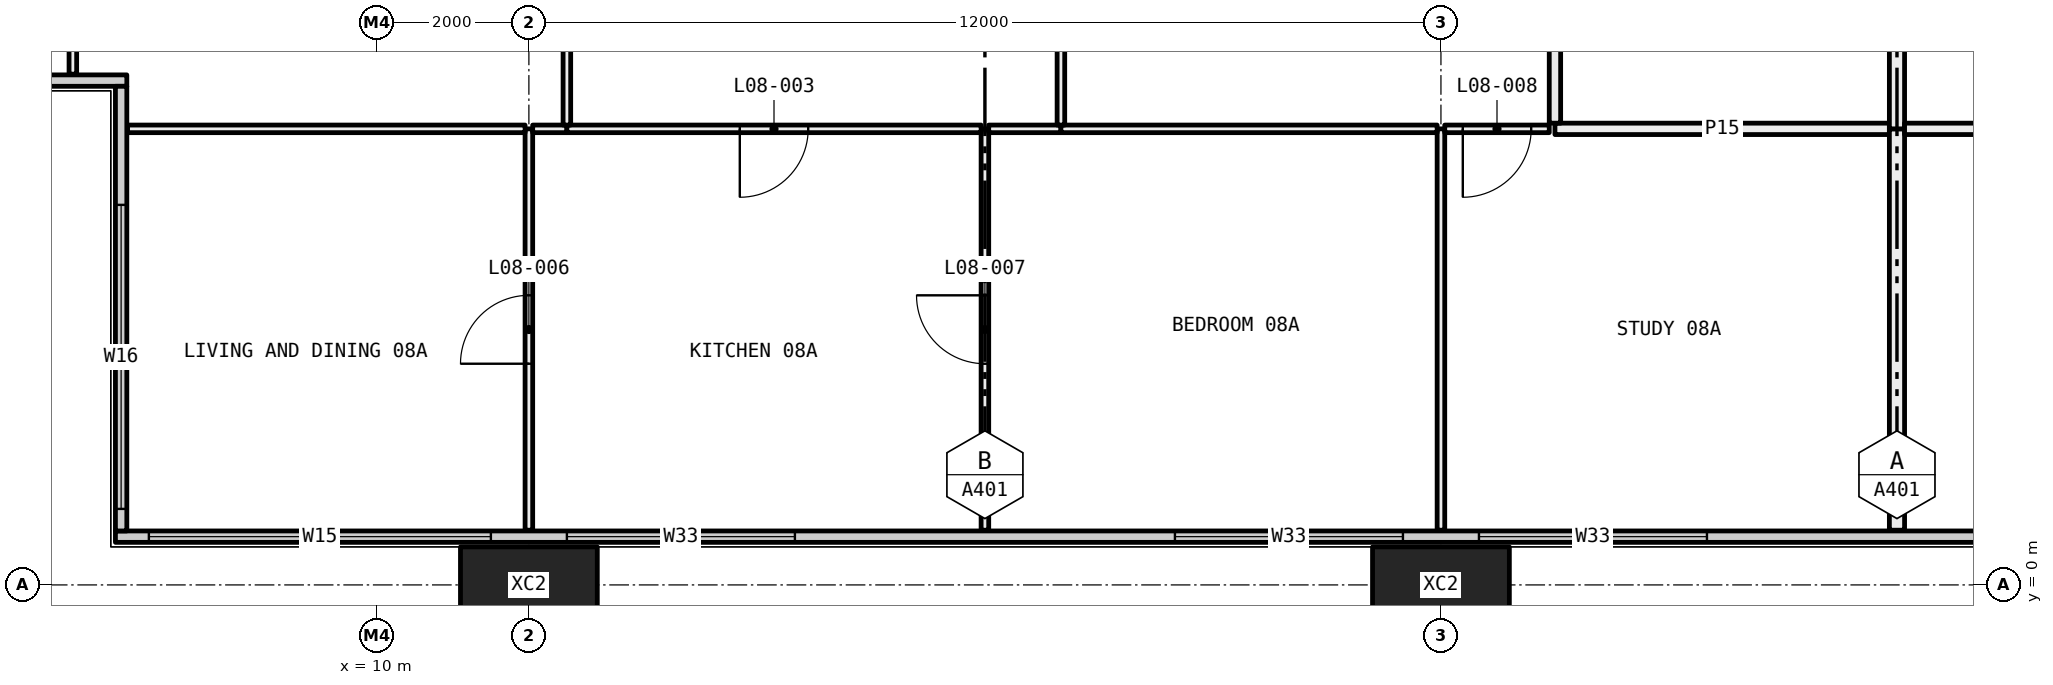
"""IFC4 building model, lengths in metres.
Left out: names, types, materials, properties, quantities, classifications, styles, units other than length and angle.
Written with IfcOpenShell. Run it as: python <this file> out.ifc"""

import sys

from ifc_helpers import new_model, si_unit, direction, frame, frame_2d, origin, origin_2d, place, context, subcontext, project, spatial, rectangle, hollow_rectangle, extrude, element, fill, save


model = new_model("IFC4")
c1 = context("Model", 3, precision=1e-05, world=origin(), true_north=direction((0.0, 1.0)))
c2 = subcontext(c1, "Body", "Model", "MODEL_VIEW")
j1 = project(units=[si_unit("LENGTHUNIT", "METRE"), si_unit("PLANEANGLEUNIT", "RADIAN")], contexts=[c1])
p1 = place(None, origin())
s1 = spatial("IfcSite", under=j1, at=p1, CompositionType="ELEMENT")
p2 = place(p1, origin())
s2 = spatial("IfcBuilding", under=s1, at=p2, CompositionType="ELEMENT")
p3 = place(p2, frame((0.0, 0.0, 40.35)))
s3 = spatial("IfcBuildingStorey", under=s2, at=p3, CompositionType="ELEMENT", Elevation=40.35)
for number, where, z_axis, x_axis in (
    (1, (12.0, 0.0, -0.4), (0.0, 0.0, 1.0), (1.0, 0.0, 0.0)),
    (2, (24.0, 0.0, -0.4), (0.0, 0.0, 1.0), (1.0, 0.0, 0.0)),
):
    element("IfcColumn", number, at=place(p3, frame(where, z_axis=z_axis, x_axis=x_axis)), inside=s3, PredefinedType="COLUMN", context=c2, shape_type="SweptSolid", body=[
        extrude(hollow_rectangle(XDim=1.8, YDim=1.0, WallThickness=0.07, at=origin_2d()), origin(), (0.0, 0.0, 1.0), 3.45),
    ])
p4 = place(p3, frame((6.56, 0.635, 0.0), z_axis=(0.0, 0.0, 1.0), x_axis=(1.0, 0.0, 0.0)))
e3 = element("IfcWall", 3, at=p4, inside=s3, PredefinedType="ELEMENTEDWALL", context=c2, shape_type="SweptSolid", body=[
    extrude(rectangle(XDim=58.88, YDim=0.15, at=frame_2d((29.44, 0.0))), origin(), (0.0, 0.0, 1.0), 3.05),
])
p5 = place(p4, frame((0.44, 0.0, 0.45)))
e4 = element("IfcOpeningElement", 4, at=p5, cuts=e3, PredefinedType="OPENING", context=c2, shape_type="SweptSolid", body=[
    extrude(rectangle(XDim=4.5, YDim=2.55, at=frame_2d((2.25, 1.275))), frame((0.0, 0.085, 0.0), z_axis=(0.0, -1.0, 0.0), x_axis=(1.0, 0.0, 0.0)), (0.0, 0.0, 1.0), 0.17),
])
p6 = place(p4, frame((5.94, 0.0, 0.45)))
e5 = element("IfcOpeningElement", 5, at=p6, cuts=e3, PredefinedType="OPENING", context=c2, shape_type="SweptSolid", body=[
    extrude(rectangle(XDim=3.0, YDim=2.55, at=frame_2d((1.5, 1.275))), frame((0.0, 0.085, 0.0), z_axis=(0.0, -1.0, 0.0), x_axis=(1.0, 0.0, 0.0)), (0.0, 0.0, 1.0), 0.17),
])
p7 = place(p4, frame((13.94, 0.0, 0.45)))
e6 = element("IfcOpeningElement", 6, at=p7, cuts=e3, PredefinedType="OPENING", context=c2, shape_type="SweptSolid", body=[
    extrude(rectangle(XDim=3.0, YDim=2.55, at=frame_2d((1.5, 1.275))), frame((0.0, 0.085, 0.0), z_axis=(0.0, -1.0, 0.0), x_axis=(1.0, 0.0, 0.0)), (0.0, 0.0, 1.0), 0.17),
])
p8 = place(p4, frame((17.94, 0.0, 0.45)))
e7 = element("IfcOpeningElement", 7, at=p8, cuts=e3, PredefinedType="OPENING", context=c2, shape_type="SweptSolid", body=[
    extrude(rectangle(XDim=3.0, YDim=2.55, at=frame_2d((1.5, 1.275))), frame((0.0, 0.085, 0.0), z_axis=(0.0, -1.0, 0.0), x_axis=(1.0, 0.0, 0.0)), (0.0, 0.0, 1.0), 0.17),
])
p9 = place(p4, frame((26.94, 0.0, 0.45)))
e8 = element("IfcOpeningElement", 8, at=p9, cuts=e3, PredefinedType="OPENING", context=c2, shape_type="SweptSolid", body=[
    extrude(rectangle(XDim=2.0, YDim=2.55, at=frame_2d((1.0, 1.275))), frame((0.0, 0.085, 0.0), z_axis=(0.0, -1.0, 0.0), x_axis=(1.0, 0.0, 0.0)), (0.0, 0.0, 1.0), 0.17),
])
p10 = place(p4, frame((29.94, 0.0, 0.45)))
e9 = element("IfcOpeningElement", 9, at=p10, cuts=e3, PredefinedType="OPENING", context=c2, shape_type="SweptSolid", body=[
    extrude(rectangle(XDim=3.0, YDim=2.55, at=frame_2d((1.5, 1.275))), frame((0.0, 0.085, 0.0), z_axis=(0.0, -1.0, 0.0), x_axis=(1.0, 0.0, 0.0)), (0.0, 0.0, 1.0), 0.17),
])
p11 = place(p4, frame((37.94, 0.0, 0.45)))
e10 = element("IfcOpeningElement", 10, at=p11, cuts=e3, PredefinedType="OPENING", context=c2, shape_type="SweptSolid", body=[
    extrude(rectangle(XDim=3.0, YDim=2.55, at=frame_2d((1.5, 1.275))), frame((0.0, 0.085, 0.0), z_axis=(0.0, -1.0, 0.0), x_axis=(1.0, 0.0, 0.0)), (0.0, 0.0, 1.0), 0.17),
])
p12 = place(p4, frame((41.94, 0.0, 0.45)))
e11 = element("IfcOpeningElement", 11, at=p12, cuts=e3, PredefinedType="OPENING", context=c2, shape_type="SweptSolid", body=[
    extrude(rectangle(XDim=3.0, YDim=2.55, at=frame_2d((1.5, 1.275))), frame((0.0, 0.085, 0.0), z_axis=(0.0, -1.0, 0.0), x_axis=(1.0, 0.0, 0.0)), (0.0, 0.0, 1.0), 0.17),
])
p13 = place(p4, frame((50.94, 0.0, 0.45)))
e12 = element("IfcOpeningElement", 12, at=p13, cuts=e3, PredefinedType="OPENING", context=c2, shape_type="SweptSolid", body=[
    extrude(rectangle(XDim=2.0, YDim=2.55, at=frame_2d((1.0, 1.275))), frame((0.0, 0.085, 0.0), z_axis=(0.0, -1.0, 0.0), x_axis=(1.0, 0.0, 0.0)), (0.0, 0.0, 1.0), 0.17),
])
p14 = place(p4, frame((53.94, 0.0, 0.45)))
e13 = element("IfcOpeningElement", 13, at=p14, cuts=e3, PredefinedType="OPENING", context=c2, shape_type="SweptSolid", body=[
    extrude(rectangle(XDim=4.5, YDim=2.55, at=frame_2d((2.25, 1.275))), frame((0.0, 0.085, 0.0), z_axis=(0.0, -1.0, 0.0), x_axis=(1.0, 0.0, 0.0)), (0.0, 0.0, 1.0), 0.17),
])
p15 = place(p3, frame((0.56, 6.635, 0.0), z_axis=(0.0, 0.0, 1.0), x_axis=(1.0, 0.0, 0.0)))
e14 = element("IfcWall", 14, at=p15, inside=s3, PredefinedType="ELEMENTEDWALL", context=c2, shape_type="SweptSolid", body=[
    extrude(rectangle(XDim=6.15, YDim=0.15, at=frame_2d((3.075, 0.0))), origin(), (0.0, 0.0, 1.0), 3.05),
])
p16 = place(p15, frame((0.44, 0.0, 0.45)))
e15 = element("IfcOpeningElement", 15, at=p16, cuts=e14, PredefinedType="OPENING", context=c2, shape_type="SweptSolid", body=[
    extrude(rectangle(XDim=4.0, YDim=2.55, at=frame_2d((2.0, 1.275))), frame((0.0, 0.085, 0.0), z_axis=(0.0, -1.0, 0.0), x_axis=(1.0, 0.0, 0.0)), (0.0, 0.0, 1.0), 0.17),
])
p17 = place(p3, frame((6.635, 0.71, 0.0), z_axis=(0.0, 0.0, 1.0), x_axis=(0.0, 1.0, 0.0)))
e16 = element("IfcWall", 16, at=p17, inside=s3, PredefinedType="ELEMENTEDWALL", context=c2, shape_type="SweptSolid", body=[
    extrude(rectangle(XDim=5.85, YDim=0.15, at=frame_2d((2.925, 0.0))), origin(), (0.0, 0.0, 1.0), 3.05),
])
p18 = place(p17, frame((0.29, 0.0, 0.45)))
e17 = element("IfcOpeningElement", 17, at=p18, cuts=e16, PredefinedType="OPENING", context=c2, shape_type="SweptSolid", body=[
    extrude(rectangle(XDim=4.0, YDim=2.55, at=frame_2d((2.0, 1.275))), frame((0.0, 0.085, 0.0), z_axis=(0.0, -1.0, 0.0), x_axis=(1.0, 0.0, 0.0)), (0.0, 0.0, 1.0), 0.17),
])
p19 = place(p3, frame((12.0, 0.72, 0.0), z_axis=(0.0, 0.0, 1.0), x_axis=(0.0, 1.0, 0.0)))
e18 = element("IfcWall", 18, at=p19, inside=s3, PredefinedType="PARTITIONING", context=c2, shape_type="SweptSolid", body=[
    extrude(rectangle(XDim=5.28, YDim=0.1, at=frame_2d((2.64, 0.0))), origin(), (0.0, 0.0, 1.0), 2.45),
])
p20 = place(p19, frame((2.19, 0.0, 0.0)))
e19 = element("IfcOpeningElement", 19, at=p20, cuts=e18, PredefinedType="OPENING", context=c2, shape_type="SweptSolid", body=[
    extrude(rectangle(XDim=0.9, YDim=2.1, at=frame_2d((0.45, 1.05))), frame((0.0, 0.06, 0.0), z_axis=(0.0, -1.0, 0.0), x_axis=(1.0, 0.0, 0.0)), (0.0, 0.0, 1.0), 0.12),
])
p21 = place(p3, frame((11.95, 6.0, 0.0), z_axis=(0.0, 0.0, 1.0), x_axis=(-1.0, 0.0, 0.0)))
e20 = element("IfcWall", 20, at=p21, inside=s3, PredefinedType="PARTITIONING", context=c2, shape_type="SweptSolid", body=[
    extrude(rectangle(XDim=5.23, YDim=0.1, at=frame_2d((2.615, 0.0))), origin(), (0.0, 0.0, 1.0), 2.45),
])
p22 = place(p3, frame((18.0, 0.72, 0.0), z_axis=(0.0, 0.0, 1.0), x_axis=(0.0, 1.0, 0.0)))
e21 = element("IfcWall", 21, at=p22, inside=s3, PredefinedType="PARTITIONING", context=c2, shape_type="SweptSolid", body=[
    extrude(rectangle(XDim=5.28, YDim=0.1, at=frame_2d((2.64, 0.0))), origin(), (0.0, 0.0, 1.0), 3.05),
])
p23 = place(p22, frame((2.19, 0.0, 0.0)))
e22 = element("IfcOpeningElement", 22, at=p23, cuts=e21, PredefinedType="OPENING", context=c2, shape_type="SweptSolid", body=[
    extrude(rectangle(XDim=0.9, YDim=2.1, at=frame_2d((0.45, 1.05))), frame((0.0, 0.06, 0.0), z_axis=(0.0, -1.0, 0.0), x_axis=(1.0, 0.0, 0.0)), (0.0, 0.0, 1.0), 0.12),
])
p24 = place(p3, frame((12.5, 6.0, 0.0), z_axis=(0.0, 0.0, 1.0), x_axis=(-1.0, 0.0, 0.0)))
e23 = element("IfcWall", 23, at=p24, inside=s3, PredefinedType="PARTITIONING", context=c2, shape_type="SweptSolid", body=[
    extrude(rectangle(XDim=0.45, YDim=0.1, at=frame_2d((0.225, 0.0))), origin(), (0.0, 0.0, 1.0), 2.45),
])
p25 = place(p3, frame((17.95, 6.0, 0.0), z_axis=(0.0, 0.0, 1.0), x_axis=(-1.0, 0.0, 0.0)))
e24 = element("IfcWall", 24, at=p25, inside=s3, PredefinedType="PARTITIONING", context=c2, shape_type="SweptSolid", body=[
    extrude(rectangle(XDim=5.45, YDim=0.1, at=frame_2d((2.725, 0.0))), origin(), (0.0, 0.0, 1.0), 3.05),
])
p26 = place(p25, frame((2.275, 0.0, 0.0)))
e25 = element("IfcOpeningElement", 25, at=p26, cuts=e24, PredefinedType="OPENING", context=c2, shape_type="SweptSolid", body=[
    extrude(rectangle(XDim=0.9, YDim=2.1, at=frame_2d((0.45, 1.05))), frame((0.0, 0.06, 0.0), z_axis=(0.0, -1.0, 0.0), x_axis=(1.0, 0.0, 0.0)), (0.0, 0.0, 1.0), 0.12),
])
p27 = place(p3, frame((24.0, 0.72, 0.0), z_axis=(0.0, 0.0, 1.0), x_axis=(0.0, 1.0, 0.0)))
e26 = element("IfcWall", 26, at=p27, inside=s3, PredefinedType="PARTITIONING", context=c2, shape_type="SweptSolid", body=[
    extrude(rectangle(XDim=5.28, YDim=0.1, at=frame_2d((2.64, 0.0))), origin(), (0.0, 0.0, 1.0), 2.45),
])
p28 = place(p3, frame((19.0, 6.0, 0.0), z_axis=(0.0, 0.0, 1.0), x_axis=(-1.0, 0.0, 0.0)))
e27 = element("IfcWall", 27, at=p28, inside=s3, PredefinedType="PARTITIONING", context=c2, shape_type="SweptSolid", body=[
    extrude(rectangle(XDim=0.95, YDim=0.1, at=frame_2d((0.475, 0.0))), origin(), (0.0, 0.0, 1.0), 3.05),
])
p29 = place(p3, frame((23.95, 6.0, 0.0), z_axis=(0.0, 0.0, 1.0), x_axis=(-1.0, 0.0, 0.0)))
e28 = element("IfcWall", 28, at=p29, inside=s3, PredefinedType="PARTITIONING", context=c2, shape_type="SweptSolid", body=[
    extrude(rectangle(XDim=4.95, YDim=0.1, at=frame_2d((2.475, 0.0))), origin(), (0.0, 0.0, 1.0), 2.45),
])
p30 = place(p3, frame((25.425, 6.0, 0.0), z_axis=(0.0, 0.0, 1.0), x_axis=(-1.0, 0.0, 0.0)))
e29 = element("IfcWall", 29, at=p30, inside=s3, PredefinedType="PARTITIONING", context=c2, shape_type="SweptSolid", body=[
    extrude(rectangle(XDim=1.375, YDim=0.1, at=frame_2d((0.688, 0.0))), origin(), (0.0, 0.0, 1.0), 2.45),
])
p31 = place(p30, frame((0.238, 0.0, 0.0)))
e30 = element("IfcOpeningElement", 30, at=p31, cuts=e29, PredefinedType="OPENING", context=c2, shape_type="SweptSolid", body=[
    extrude(rectangle(XDim=0.9, YDim=2.1, at=frame_2d((0.45, 1.05))), frame((0.0, 0.06, 0.0), z_axis=(0.0, -1.0, 0.0), x_axis=(1.0, 0.0, 0.0)), (0.0, 0.0, 1.0), 0.12),
])
p32 = place(p3, frame((29.9, 6.0, 0.0), z_axis=(0.0, 0.0, 1.0), x_axis=(-1.0, 0.0, 0.0)))
e31 = element("IfcWall", 31, at=p32, inside=s3, PredefinedType="PARTITIONING", context=c2, shape_type="SweptSolid", body=[
    extrude(rectangle(XDim=4.4, YDim=0.15, at=frame_2d((2.2, 0.0))), origin(), (0.0, 0.0, 1.0), 3.05),
])
p33 = place(p3, frame((30.0, 0.72, 0.0), z_axis=(0.0, 0.0, 1.0), x_axis=(0.0, 1.0, 0.0)))
e32 = element("IfcWall", 32, at=p33, inside=s3, PredefinedType="PARTITIONING", context=c2, shape_type="SweptSolid", body=[
    extrude(rectangle(XDim=5.28, YDim=0.2, at=frame_2d((2.64, 0.0))), origin(), (0.0, 0.0, 1.0), 3.05),
])
p34 = place(p3, frame((6.0, 6.72, 0.0), z_axis=(0.0, 0.0, 1.0), x_axis=(0.0, 1.0, 0.0)))
e33 = element("IfcWall", 33, at=p34, inside=s3, PredefinedType="PARTITIONING", context=c2, shape_type="SweptSolid", body=[
    extrude(rectangle(XDim=5.28, YDim=0.1, at=frame_2d((2.64, 0.0))), origin(), (0.0, 0.0, 1.0), 2.45),
])
p35 = place(p34, frame((2.19, 0.0, 0.0)))
e34 = element("IfcOpeningElement", 34, at=p35, cuts=e33, PredefinedType="OPENING", context=c2, shape_type="SweptSolid", body=[
    extrude(rectangle(XDim=0.9, YDim=2.1, at=frame_2d((0.45, 1.05))), frame((0.0, 0.06, 0.0), z_axis=(0.0, -1.0, 0.0), x_axis=(1.0, 0.0, 0.0)), (0.0, 0.0, 1.0), 0.12),
])
p36 = place(p3, frame((12.5, 6.05, 0.0), z_axis=(0.0, 0.0, 1.0), x_axis=(0.0, 1.0, 0.0)))
e35 = element("IfcWall", 35, at=p36, inside=s3, PredefinedType="PARTITIONING", context=c2, shape_type="SweptSolid", body=[
    extrude(rectangle(XDim=5.15, YDim=0.1, at=frame_2d((2.575, 0.0))), origin(), (0.0, 0.0, 1.0), 3.05),
])
p37 = place(p36, frame((2.125, 0.0, 0.0)))
e36 = element("IfcOpeningElement", 36, at=p37, cuts=e35, PredefinedType="OPENING", context=c2, shape_type="SweptSolid", body=[
    extrude(rectangle(XDim=0.9, YDim=2.1, at=frame_2d((0.45, 1.05))), frame((0.0, 0.06, 0.0), z_axis=(0.0, -1.0, 0.0), x_axis=(1.0, 0.0, 0.0)), (0.0, 0.0, 1.0), 0.12),
])
p38 = place(p3, frame((19.0, 6.05, 0.0), z_axis=(0.0, 0.0, 1.0), x_axis=(0.0, 1.0, 0.0)))
e37 = element("IfcWall", 37, at=p38, inside=s3, PredefinedType="PARTITIONING", context=c2, shape_type="SweptSolid", body=[
    extrude(rectangle(XDim=5.95, YDim=0.1, at=frame_2d((2.975, 0.0))), origin(), (0.0, 0.0, 1.0), 2.45),
])
p39 = place(p38, frame((2.525, 0.0, 0.0)))
e38 = element("IfcOpeningElement", 38, at=p39, cuts=e37, PredefinedType="OPENING", context=c2, shape_type="SweptSolid", body=[
    extrude(rectangle(XDim=0.9, YDim=2.1, at=frame_2d((0.45, 1.05))), frame((0.0, 0.06, 0.0), z_axis=(0.0, -1.0, 0.0), x_axis=(1.0, 0.0, 0.0)), (0.0, 0.0, 1.0), 0.12),
])
p40 = place(p3, frame((25.5, 6.075, 0.0), z_axis=(0.0, 0.0, 1.0), x_axis=(0.0, 1.0, 0.0)))
e39 = element("IfcWall", 39, at=p40, inside=s3, PredefinedType="PARTITIONING", context=c2, shape_type="SweptSolid", body=[
    extrude(rectangle(XDim=2.925, YDim=0.15, at=frame_2d((1.462, 0.0))), origin(), (0.0, 0.0, 1.0), 3.05),
])
p41 = place(p40, frame((1.012, 0.0, 0.0)))
e40 = element("IfcOpeningElement", 40, at=p41, cuts=e39, PredefinedType="OPENING", context=c2, shape_type="SweptSolid", body=[
    extrude(rectangle(XDim=0.9, YDim=2.1, at=frame_2d((0.45, 1.05))), frame((0.0, 0.085, 0.0), z_axis=(0.0, -1.0, 0.0), x_axis=(1.0, 0.0, 0.0)), (0.0, 0.0, 1.0), 0.17),
])
p42 = place(p3, frame((30.0, 6.0, 0.0), z_axis=(0.0, 0.0, 1.0), x_axis=(0.0, 1.0, 0.0)))
e41 = element("IfcWall", 41, at=p42, inside=s3, PredefinedType="PARTITIONING", context=c2, shape_type="SweptSolid", body=[
    extrude(rectangle(XDim=3.0, YDim=0.2, at=frame_2d((1.5, 0.0))), origin(), (0.0, 0.0, 1.0), 3.05),
])
p43 = place(p3, frame((34.5, 6.0, 0.0), z_axis=(0.0, 0.0, 1.0), x_axis=(-1.0, 0.0, 0.0)))
e42 = element("IfcWall", 42, at=p43, inside=s3, PredefinedType="PARTITIONING", context=c2, shape_type="SweptSolid", body=[
    extrude(rectangle(XDim=4.4, YDim=0.15, at=frame_2d((2.2, 0.0))), origin(), (0.0, 0.0, 1.0), 3.05),
])
p44 = place(p43, frame((1.75, 0.0, 0.0)))
e43 = element("IfcOpeningElement", 43, at=p44, cuts=e42, PredefinedType="OPENING", context=c2, shape_type="SweptSolid", body=[
    extrude(rectangle(XDim=0.9, YDim=2.1, at=frame_2d((0.45, 1.05))), frame((0.0, 0.085, 0.0), z_axis=(0.0, -1.0, 0.0), x_axis=(1.0, 0.0, 0.0)), (0.0, 0.0, 1.0), 0.17),
])
p45 = place(p5, origin())
e44 = element("IfcWindow", 44, at=p45, inside=s3, PartitioningType="SINGLE_PANEL", PredefinedType="WINDOW", context=c2, shape_type="SweptSolid", body=[
    extrude(rectangle(XDim=4.5, YDim=2.55, at=frame_2d((2.25, 1.275))), frame((0.0, 0.03, 0.0), z_axis=(0.0, -1.0, 0.0), x_axis=(1.0, 0.0, 0.0)), (0.0, 0.0, 1.0), 0.06),
])
fill(e4, e44)
p46 = place(p6, origin())
e45 = element("IfcWindow", 45, at=p46, inside=s3, PartitioningType="SINGLE_PANEL", PredefinedType="WINDOW", context=c2, shape_type="SweptSolid", body=[
    extrude(rectangle(XDim=3.0, YDim=2.55, at=frame_2d((1.5, 1.275))), frame((0.0, 0.03, 0.0), z_axis=(0.0, -1.0, 0.0), x_axis=(1.0, 0.0, 0.0)), (0.0, 0.0, 1.0), 0.06),
])
fill(e5, e45)
p47 = place(p7, origin())
e46 = element("IfcWindow", 46, at=p47, inside=s3, PartitioningType="SINGLE_PANEL", PredefinedType="WINDOW", context=c2, shape_type="SweptSolid", body=[
    extrude(rectangle(XDim=3.0, YDim=2.55, at=frame_2d((1.5, 1.275))), frame((0.0, 0.03, 0.0), z_axis=(0.0, -1.0, 0.0), x_axis=(1.0, 0.0, 0.0)), (0.0, 0.0, 1.0), 0.06),
])
fill(e6, e46)
p48 = place(p8, origin())
e47 = element("IfcWindow", 47, at=p48, inside=s3, PartitioningType="SINGLE_PANEL", PredefinedType="WINDOW", context=c2, shape_type="SweptSolid", body=[
    extrude(rectangle(XDim=3.0, YDim=2.55, at=frame_2d((1.5, 1.275))), frame((0.0, 0.03, 0.0), z_axis=(0.0, -1.0, 0.0), x_axis=(1.0, 0.0, 0.0)), (0.0, 0.0, 1.0), 0.06),
])
fill(e7, e47)
p49 = place(p18, origin())
e48 = element("IfcWindow", 48, at=p49, inside=s3, PartitioningType="SINGLE_PANEL", PredefinedType="WINDOW", context=c2, shape_type="SweptSolid", body=[
    extrude(rectangle(XDim=4.0, YDim=2.55, at=frame_2d((2.0, 1.275))), frame((0.0, 0.03, 0.0), z_axis=(0.0, -1.0, 0.0), x_axis=(1.0, 0.0, 0.0)), (0.0, 0.0, 1.0), 0.06),
])
fill(e17, e48)
p50 = place(p26, origin())
e49 = element("IfcDoor", 49, at=p50, inside=s3, OperationType="SINGLE_SWING_LEFT", PredefinedType="DOOR", context=c2, shape_type="SweptSolid", body=[
    extrude(rectangle(XDim=0.9, YDim=2.1, at=frame_2d((0.45, 1.05))), frame((0.0, 0.025, 0.0), z_axis=(0.0, -1.0, 0.0), x_axis=(1.0, 0.0, 0.0)), (0.0, 0.0, 1.0), 0.05),
])
fill(e25, e49)
p51 = place(p20, origin())
e50 = element("IfcDoor", 50, at=p51, inside=s3, OperationType="SINGLE_SWING_RIGHT", PredefinedType="DOOR", context=c2, shape_type="SweptSolid", body=[
    extrude(rectangle(XDim=0.9, YDim=2.1, at=frame_2d((0.45, 1.05))), frame((0.0, 0.025, 0.0), z_axis=(0.0, -1.0, 0.0), x_axis=(1.0, 0.0, 0.0)), (0.0, 0.0, 1.0), 0.05),
])
fill(e19, e50)
p52 = place(p23, origin())
e51 = element("IfcDoor", 51, at=p52, inside=s3, OperationType="SINGLE_SWING_LEFT", PredefinedType="DOOR", context=c2, shape_type="SweptSolid", body=[
    extrude(rectangle(XDim=0.9, YDim=2.1, at=frame_2d((0.45, 1.05))), frame((0.0, 0.025, 0.0), z_axis=(0.0, -1.0, 0.0), x_axis=(1.0, 0.0, 0.0)), (0.0, 0.0, 1.0), 0.05),
])
fill(e22, e51)
p53 = place(p31, origin())
e52 = element("IfcDoor", 52, at=p53, inside=s3, OperationType="SINGLE_SWING_LEFT", PredefinedType="DOOR", context=c2, shape_type="SweptSolid", body=[
    extrude(rectangle(XDim=0.9, YDim=2.1, at=frame_2d((0.45, 1.05))), frame((0.0, 0.025, 0.0), z_axis=(0.0, -1.0, 0.0), x_axis=(1.0, 0.0, 0.0)), (0.0, 0.0, 1.0), 0.05),
])
fill(e30, e52)
save(model, sys.argv[1])
